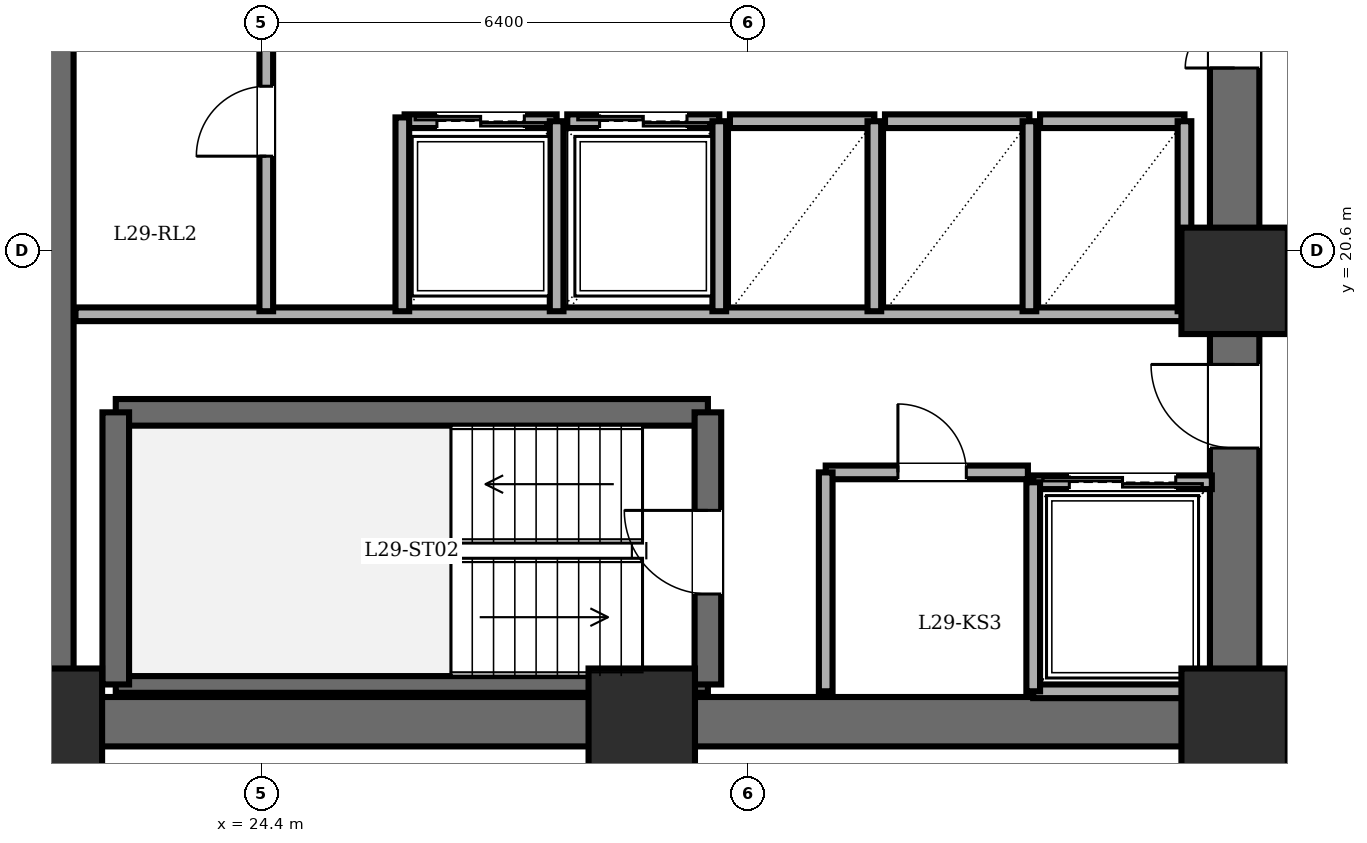
"""IFC4 building model, lengths in metres.
Left out: names, types, materials, properties, quantities, classifications, styles, units other than length and angle.
Written with IfcOpenShell. Run it as: python <this file> out.ifc"""

import sys

from ifc_helpers import new_model, si_unit, direction, frame, frame_2d, origin, origin_2d, place, context, subcontext, project, spatial, rectangle, extrude, element, fill, save


model = new_model("IFC4")
c1 = context("Model", 3, precision=1e-05, world=origin(), true_north=direction((0.0, 1.0)))
c2 = subcontext(c1, "Body", "Model", "MODEL_VIEW")
j1 = project(units=[si_unit("LENGTHUNIT", "METRE"), si_unit("PLANEANGLEUNIT", "RADIAN")], contexts=[c1])
p1 = place(None, origin())
s1 = spatial("IfcSite", under=j1, at=p1, CompositionType="ELEMENT")
p2 = place(p1, origin())
s2 = spatial("IfcBuilding", under=s1, at=p2, CompositionType="ELEMENT")
p3 = place(p2, frame((0.0, 0.0, 111.5)))
s3 = spatial("IfcBuildingStorey", under=s2, at=p3, CompositionType="ELEMENT", Elevation=111.5)
for number, where, z_axis, x_axis in (
    (1, (21.6, 14.4, 0.0), (0.0, 0.0, 1.0), (1.0, 0.0, 0.0)),
    (2, (29.4, 14.4, 0.0), (0.0, 0.0, 1.0), (1.0, 0.0, 0.0)),
    (3, (37.2, 14.4, 0.0), (0.0, 0.0, 1.0), (1.0, 0.0, 0.0)),
    (4, (37.2, 20.2, 0.0), (0.0, 0.0, 1.0), (1.0, 0.0, 0.0)),
):
    element("IfcColumn", number, at=place(p3, frame(where, z_axis=z_axis, x_axis=x_axis)), inside=s3, PredefinedType="COLUMN", context=c2, shape_type="SweptSolid", body=[
        extrude(rectangle(XDim=1.4, YDim=1.4, at=origin_2d()), origin(), (0.0, 0.0, 1.0), 3.6),
    ])
p4 = place(p3, frame((21.6, 14.4, 0.0), z_axis=(0.0, 0.0, 1.0), x_axis=(0.0, 1.0, 0.0)))
e5 = element("IfcWall", 5, at=p4, inside=s3, PredefinedType="SHEAR", context=c2, shape_type="SweptSolid", body=[
    extrude(rectangle(XDim=19.2, YDim=0.65, at=frame_2d((9.6, 0.0))), origin(), (0.0, 0.0, 1.0), 3.4),
])
p5 = place(p3, frame((37.2, 14.4, 0.0), z_axis=(0.0, 0.0, 1.0), x_axis=(-1.0, 0.0, 0.0)))
e6 = element("IfcWall", 6, at=p5, inside=s3, PredefinedType="SHEAR", context=c2, shape_type="SweptSolid", body=[
    extrude(rectangle(XDim=15.6, YDim=0.65, at=frame_2d((7.8, 0.0))), origin(), (0.0, 0.0, 1.0), 3.4),
])
p6 = place(p3, frame((37.2, 14.4, 0.0), z_axis=(0.0, 0.0, 1.0), x_axis=(0.0, 1.0, 0.0)))
e7 = element("IfcWall", 7, at=p6, inside=s3, PredefinedType="SHEAR", context=c2, shape_type="SweptSolid", body=[
    extrude(rectangle(XDim=19.2, YDim=0.65, at=frame_2d((9.6, 0.0))), origin(), (0.0, 0.0, 1.0), 3.4),
])
p7 = place(p6, frame((15.8, 0.0, 0.0)))
e8 = element("IfcOpeningElement", 8, at=p7, cuts=e7, PredefinedType="OPENING", context=c2, shape_type="SweptSolid", body=[
    extrude(rectangle(XDim=1.15, YDim=2.15, at=frame_2d((0.575, 1.075))), frame((0.0, 0.335, 0.0), z_axis=(0.0, -1.0, 0.0), x_axis=(1.0, 0.0, 0.0)), (0.0, 0.0, 1.0), 0.67),
])
p8 = place(p6, frame((3.6, 0.0, 0.0)))
e9 = element("IfcOpeningElement", 9, at=p8, cuts=e7, PredefinedType="OPENING", context=c2, shape_type="SweptSolid", body=[
    extrude(rectangle(XDim=1.1, YDim=2.15, at=frame_2d((0.55, 1.075))), frame((0.0, 0.335, 0.0), z_axis=(0.0, -1.0, 0.0), x_axis=(1.0, 0.0, 0.0)), (0.0, 0.0, 1.0), 0.67),
])
p9 = place(p6, frame((8.6, 0.0, 0.0)))
e10 = element("IfcOpeningElement", 10, at=p9, cuts=e7, PredefinedType="OPENING", context=c2, shape_type="SweptSolid", body=[
    extrude(rectangle(XDim=1.3, YDim=2.2, at=frame_2d((0.65, 1.1))), frame((0.0, 0.335, 0.0), z_axis=(0.0, -1.0, 0.0), x_axis=(1.0, 0.0, 0.0)), (0.0, 0.0, 1.0), 0.67),
])
p10 = place(p3, frame((22.48, 18.47, 0.0), z_axis=(0.0, 0.0, 1.0), x_axis=(1.0, 0.0, 0.0)))
e11 = element("IfcWall", 11, at=p10, inside=s3, PredefinedType="SOLIDWALL", context=c2, shape_type="SweptSolid", body=[
    extrude(rectangle(XDim=7.79, YDim=0.35, at=frame_2d((3.895, 0.0))), origin(), (0.0, 0.0, 1.0), 3.4),
])
p11 = place(p3, frame((22.48, 14.89, 0.0), z_axis=(0.0, 0.0, 1.0), x_axis=(1.0, 0.0, 0.0)))
e12 = element("IfcWall", 12, at=p11, inside=s3, PredefinedType="PARTITIONING", context=c2, shape_type="SweptSolid", body=[
    extrude(rectangle(XDim=7.79, YDim=0.22, at=frame_2d((3.895, 0.0))), origin(), (0.0, 0.0, 1.0), 3.4),
])
p12 = place(p3, frame((22.48, 14.89, 0.0), z_axis=(0.0, 0.0, 1.0), x_axis=(0.0, 1.0, 0.0)))
e13 = element("IfcWall", 13, at=p12, inside=s3, PredefinedType="SOLIDWALL", context=c2, shape_type="SweptSolid", body=[
    extrude(rectangle(XDim=3.58, YDim=0.35, at=frame_2d((1.79, 0.0))), origin(), (0.0, 0.0, 1.0), 3.4),
])
p13 = place(p3, frame((30.27, 14.89, 0.0), z_axis=(0.0, 0.0, 1.0), x_axis=(0.0, 1.0, 0.0)))
e14 = element("IfcWall", 14, at=p13, inside=s3, PredefinedType="SOLIDWALL", context=c2, shape_type="SweptSolid", body=[
    extrude(rectangle(XDim=3.58, YDim=0.35, at=frame_2d((1.79, 0.0))), origin(), (0.0, 0.0, 1.0), 3.4),
])
p14 = place(p13, frame((1.19, 0.0, 0.0)))
e15 = element("IfcOpeningElement", 15, at=p14, cuts=e14, PredefinedType="OPENING", context=c2, shape_type="SweptSolid", body=[
    extrude(rectangle(XDim=1.1, YDim=2.15, at=frame_2d((0.55, 1.075))), frame((0.0, 0.185, 0.0), z_axis=(0.0, -1.0, 0.0), x_axis=(1.0, 0.0, 0.0)), (0.0, 0.0, 1.0), 0.37),
])
p15 = place(p3, frame((21.95, 19.76, 0.0), z_axis=(0.0, 0.0, 1.0), x_axis=(1.0, 0.0, 0.0)))
e16 = element("IfcWall", 16, at=p15, inside=s3, PredefinedType="PARTITIONING", context=c2, shape_type="SweptSolid", body=[
    extrude(rectangle(XDim=14.87, YDim=0.18, at=frame_2d((7.435, 0.0))), origin(), (0.0, 0.0, 1.0), 3.4),
])
p16 = place(p3, frame((31.82, 17.68, 0.0), z_axis=(0.0, 0.0, 1.0), x_axis=(1.0, 0.0, 0.0)))
e17 = element("IfcWall", 17, at=p16, inside=s3, PredefinedType="PARTITIONING", context=c2, shape_type="SweptSolid", body=[
    extrude(rectangle(XDim=2.66, YDim=0.18, at=frame_2d((1.33, 0.0))), origin(), (0.0, 0.0, 1.0), 3.4),
])
p17 = place(p16, frame((0.95, 0.0, 0.0)))
e18 = element("IfcOpeningElement", 18, at=p17, cuts=e17, PredefinedType="OPENING", context=c2, shape_type="SweptSolid", body=[
    extrude(rectangle(XDim=0.9, YDim=2.05, at=frame_2d((0.45, 1.025))), frame((0.0, 0.1, 0.0), z_axis=(0.0, -1.0, 0.0), x_axis=(1.0, 0.0, 0.0)), (0.0, 0.0, 1.0), 0.2),
])
p18 = place(p3, frame((31.82, 14.8, 0.0), z_axis=(0.0, 0.0, 1.0), x_axis=(0.0, 1.0, 0.0)))
e19 = element("IfcWall", 19, at=p18, inside=s3, PredefinedType="PARTITIONING", context=c2, shape_type="SweptSolid", body=[
    extrude(rectangle(XDim=2.88, YDim=0.18, at=frame_2d((1.44, 0.0))), origin(), (0.0, 0.0, 1.0), 3.4),
])
p19 = place(p3, frame((34.55, 17.55, 0.0), z_axis=(0.0, 0.0, 1.0), x_axis=(1.0, 0.0, 0.0)))
e20 = element("IfcWall", 20, at=p19, inside=s3, PredefinedType="PARTITIONING", context=c2, shape_type="SweptSolid", body=[
    extrude(rectangle(XDim=2.35, YDim=0.18, at=frame_2d((1.175, 0.0))), origin(), (0.0, 0.0, 1.0), 3.4),
])
p20 = place(p19, frame((0.475, 0.0, 0.0)))
e21 = element("IfcOpeningElement", 21, at=p20, cuts=e20, PredefinedType="OPENING", context=c2, shape_type="SweptSolid", body=[
    extrude(rectangle(XDim=1.4, YDim=2.3, at=frame_2d((0.7, 1.15))), frame((0.0, 0.1, 0.0), z_axis=(0.0, -1.0, 0.0), x_axis=(1.0, 0.0, 0.0)), (0.0, 0.0, 1.0), 0.2),
])
p21 = place(p3, frame((36.9, 14.8, 0.0), z_axis=(0.0, 0.0, 1.0), x_axis=(-1.0, 0.0, 0.0)))
e22 = element("IfcWall", 22, at=p21, inside=s3, PredefinedType="PARTITIONING", context=c2, shape_type="SweptSolid", body=[
    extrude(rectangle(XDim=2.35, YDim=0.18, at=frame_2d((1.175, 0.0))), origin(), (0.0, 0.0, 1.0), 3.4),
])
p22 = place(p3, frame((34.55, 17.55, 0.0), z_axis=(0.0, 0.0, 1.0), x_axis=(0.0, -1.0, 0.0)))
e23 = element("IfcWall", 23, at=p22, inside=s3, PredefinedType="PARTITIONING", context=c2, shape_type="SweptSolid", body=[
    extrude(rectangle(XDim=2.75, YDim=0.18, at=frame_2d((1.375, 0.0))), origin(), (0.0, 0.0, 1.0), 3.4),
])
p23 = place(p3, frame((26.28, 22.3, 0.0), z_axis=(0.0, 0.0, 1.0), x_axis=(1.0, 0.0, 0.0)))
e24 = element("IfcWall", 24, at=p23, inside=s3, PredefinedType="PARTITIONING", context=c2, shape_type="SweptSolid", body=[
    extrude(rectangle(XDim=2.0, YDim=0.18, at=frame_2d((1.0, 0.0))), origin(), (0.0, 0.0, 1.0), 3.4),
])
p24 = place(p23, frame((0.425, 0.0, 0.0)))
e25 = element("IfcOpeningElement", 25, at=p24, cuts=e24, PredefinedType="OPENING", context=c2, shape_type="SweptSolid", body=[
    extrude(rectangle(XDim=1.15, YDim=2.2, at=frame_2d((0.575, 1.1))), frame((0.0, 0.1, 0.0), z_axis=(0.0, -1.0, 0.0), x_axis=(1.0, 0.0, 0.0)), (0.0, 0.0, 1.0), 0.2),
])
p25 = place(p3, frame((28.28, 19.8, 0.0), z_axis=(0.0, 0.0, 1.0), x_axis=(0.0, 1.0, 0.0)))
e26 = element("IfcWall", 26, at=p25, inside=s3, PredefinedType="PARTITIONING", context=c2, shape_type="SweptSolid", body=[
    extrude(rectangle(XDim=2.5, YDim=0.18, at=frame_2d((1.25, 0.0))), origin(), (0.0, 0.0, 1.0), 3.4),
])
p26 = place(p3, frame((28.42, 22.3, 0.0), z_axis=(0.0, 0.0, 1.0), x_axis=(1.0, 0.0, 0.0)))
e27 = element("IfcWall", 27, at=p26, inside=s3, PredefinedType="PARTITIONING", context=c2, shape_type="SweptSolid", body=[
    extrude(rectangle(XDim=2.0, YDim=0.18, at=frame_2d((1.0, 0.0))), origin(), (0.0, 0.0, 1.0), 3.4),
])
p27 = place(p26, frame((0.425, 0.0, 0.0)))
e28 = element("IfcOpeningElement", 28, at=p27, cuts=e27, PredefinedType="OPENING", context=c2, shape_type="SweptSolid", body=[
    extrude(rectangle(XDim=1.15, YDim=2.2, at=frame_2d((0.575, 1.1))), frame((0.0, 0.1, 0.0), z_axis=(0.0, -1.0, 0.0), x_axis=(1.0, 0.0, 0.0)), (0.0, 0.0, 1.0), 0.2),
])
p28 = place(p3, frame((30.42, 19.8, 0.0), z_axis=(0.0, 0.0, 1.0), x_axis=(0.0, 1.0, 0.0)))
e29 = element("IfcWall", 29, at=p28, inside=s3, PredefinedType="PARTITIONING", context=c2, shape_type="SweptSolid", body=[
    extrude(rectangle(XDim=2.5, YDim=0.18, at=frame_2d((1.25, 0.0))), origin(), (0.0, 0.0, 1.0), 3.4),
])
p29 = place(p3, frame((30.56, 22.3, 0.0), z_axis=(0.0, 0.0, 1.0), x_axis=(1.0, 0.0, 0.0)))
e30 = element("IfcWall", 30, at=p29, inside=s3, PredefinedType="PARTITIONING", context=c2, shape_type="SweptSolid", body=[
    extrude(rectangle(XDim=1.9, YDim=0.18, at=frame_2d((0.95, 0.0))), origin(), (0.0, 0.0, 1.0), 3.4),
])
p30 = place(p3, frame((32.46, 19.8, 0.0), z_axis=(0.0, 0.0, 1.0), x_axis=(0.0, 1.0, 0.0)))
e31 = element("IfcWall", 31, at=p30, inside=s3, PredefinedType="PARTITIONING", context=c2, shape_type="SweptSolid", body=[
    extrude(rectangle(XDim=2.5, YDim=0.18, at=frame_2d((1.25, 0.0))), origin(), (0.0, 0.0, 1.0), 3.4),
])
p31 = place(p3, frame((32.6, 22.3, 0.0), z_axis=(0.0, 0.0, 1.0), x_axis=(1.0, 0.0, 0.0)))
e32 = element("IfcWall", 32, at=p31, inside=s3, PredefinedType="PARTITIONING", context=c2, shape_type="SweptSolid", body=[
    extrude(rectangle(XDim=1.9, YDim=0.18, at=frame_2d((0.95, 0.0))), origin(), (0.0, 0.0, 1.0), 3.4),
])
p32 = place(p3, frame((34.5, 19.8, 0.0), z_axis=(0.0, 0.0, 1.0), x_axis=(0.0, 1.0, 0.0)))
e33 = element("IfcWall", 33, at=p32, inside=s3, PredefinedType="PARTITIONING", context=c2, shape_type="SweptSolid", body=[
    extrude(rectangle(XDim=2.5, YDim=0.18, at=frame_2d((1.25, 0.0))), origin(), (0.0, 0.0, 1.0), 3.4),
])
p33 = place(p3, frame((34.64, 22.3, 0.0), z_axis=(0.0, 0.0, 1.0), x_axis=(1.0, 0.0, 0.0)))
e34 = element("IfcWall", 34, at=p33, inside=s3, PredefinedType="PARTITIONING", context=c2, shape_type="SweptSolid", body=[
    extrude(rectangle(XDim=1.9, YDim=0.18, at=frame_2d((0.95, 0.0))), origin(), (0.0, 0.0, 1.0), 3.4),
])
p34 = place(p3, frame((36.54, 19.8, 0.0), z_axis=(0.0, 0.0, 1.0), x_axis=(0.0, 1.0, 0.0)))
e35 = element("IfcWall", 35, at=p34, inside=s3, PredefinedType="PARTITIONING", context=c2, shape_type="SweptSolid", body=[
    extrude(rectangle(XDim=2.5, YDim=0.18, at=frame_2d((1.25, 0.0))), origin(), (0.0, 0.0, 1.0), 3.4),
])
p35 = place(p3, frame((24.46, 19.8, 0.0), z_axis=(0.0, 0.0, 1.0), x_axis=(0.0, 1.0, 0.0)))
e36 = element("IfcWall", 36, at=p35, inside=s3, PredefinedType="PARTITIONING", context=c2, shape_type="SweptSolid", body=[
    extrude(rectangle(XDim=5.0, YDim=0.18, at=frame_2d((2.5, 0.0))), origin(), (0.0, 0.0, 1.0), 3.4),
])
p36 = place(p35, frame((2.04, 0.0, 0.0)))
e37 = element("IfcOpeningElement", 37, at=p36, cuts=e36, PredefinedType="OPENING", context=c2, shape_type="SweptSolid", body=[
    extrude(rectangle(XDim=0.92, YDim=2.1, at=frame_2d((0.46, 1.05))), frame((0.0, 0.1, 0.0), z_axis=(0.0, -1.0, 0.0), x_axis=(1.0, 0.0, 0.0)), (0.0, 0.0, 1.0), 0.2),
])
p37 = place(p3, frame((26.25, 19.8, 0.0), z_axis=(0.0, 0.0, 1.0), x_axis=(0.0, 1.0, 0.0)))
e38 = element("IfcWall", 38, at=p37, inside=s3, PredefinedType="PARTITIONING", context=c2, shape_type="SweptSolid", body=[
    extrude(rectangle(XDim=2.55, YDim=0.18, at=frame_2d((1.275, 0.0))), origin(), (0.0, 0.0, 1.0), 3.4),
])
p38 = place(p14, origin())
e39 = element("IfcDoor", 39, at=p38, inside=s3, OperationType="SINGLE_SWING_RIGHT", PredefinedType="DOOR", context=c2, shape_type="SweptSolid", body=[
    extrude(rectangle(XDim=1.1, YDim=2.15, at=frame_2d((0.55, 1.075))), frame((0.0, 0.025, 0.0), z_axis=(0.0, -1.0, 0.0), x_axis=(1.0, 0.0, 0.0)), (0.0, 0.0, 1.0), 0.05),
])
fill(e15, e39)
p39 = place(p8, origin())
e40 = element("IfcDoor", 40, at=p39, inside=s3, OperationType="SINGLE_SWING_RIGHT", PredefinedType="DOOR", context=c2, shape_type="SweptSolid", body=[
    extrude(rectangle(XDim=1.1, YDim=2.15, at=frame_2d((0.55, 1.075))), frame((0.0, 0.025, 0.0), z_axis=(0.0, -1.0, 0.0), x_axis=(1.0, 0.0, 0.0)), (0.0, 0.0, 1.0), 0.05),
])
fill(e9, e40)
p40 = place(p17, origin())
e41 = element("IfcDoor", 41, at=p40, inside=s3, OperationType="SINGLE_SWING_LEFT", PredefinedType="DOOR", context=c2, shape_type="SweptSolid", body=[
    extrude(rectangle(XDim=0.9, YDim=2.05, at=frame_2d((0.45, 1.025))), frame((0.0, 0.025, 0.0), z_axis=(0.0, -1.0, 0.0), x_axis=(1.0, 0.0, 0.0)), (0.0, 0.0, 1.0), 0.05),
])
fill(e18, e41)
p41 = place(p20, origin())
e42 = element("IfcDoor", 42, at=p41, inside=s3, OperationType="DOUBLE_DOOR_SLIDING", PredefinedType="DOOR", context=c2, shape_type="SweptSolid", body=[
    extrude(rectangle(XDim=1.4, YDim=2.3, at=frame_2d((0.7, 1.15))), frame((0.0, 0.025, 0.0), z_axis=(0.0, -1.0, 0.0), x_axis=(1.0, 0.0, 0.0)), (0.0, 0.0, 1.0), 0.05),
])
fill(e21, e42)
p42 = place(p24, origin())
e43 = element("IfcDoor", 43, at=p42, inside=s3, OperationType="DOUBLE_DOOR_SLIDING", PredefinedType="DOOR", context=c2, shape_type="SweptSolid", body=[
    extrude(rectangle(XDim=1.15, YDim=2.2, at=frame_2d((0.575, 1.1))), frame((0.0, 0.025, 0.0), z_axis=(0.0, -1.0, 0.0), x_axis=(1.0, 0.0, 0.0)), (0.0, 0.0, 1.0), 0.05),
])
fill(e25, e43)
p43 = place(p27, origin())
e44 = element("IfcDoor", 44, at=p43, inside=s3, OperationType="DOUBLE_DOOR_SLIDING", PredefinedType="DOOR", context=c2, shape_type="SweptSolid", body=[
    extrude(rectangle(XDim=1.15, YDim=2.2, at=frame_2d((0.575, 1.1))), frame((0.0, 0.025, 0.0), z_axis=(0.0, -1.0, 0.0), x_axis=(1.0, 0.0, 0.0)), (0.0, 0.0, 1.0), 0.05),
])
fill(e28, e44)
p44 = place(p36, origin())
e45 = element("IfcDoor", 45, at=p44, inside=s3, OperationType="SINGLE_SWING_LEFT", PredefinedType="DOOR", context=c2, shape_type="SweptSolid", body=[
    extrude(rectangle(XDim=0.92, YDim=2.1, at=frame_2d((0.46, 1.05))), frame((0.0, 0.025, 0.0), z_axis=(0.0, -1.0, 0.0), x_axis=(1.0, 0.0, 0.0)), (0.0, 0.0, 1.0), 0.05),
])
fill(e37, e45)
p45 = place(p9, origin())
e46 = element("IfcDoor", 46, at=p45, inside=s3, OperationType="DOUBLE_DOOR_SINGLE_SWING", PredefinedType="DOOR", context=c2, shape_type="SweptSolid", body=[
    extrude(rectangle(XDim=1.3, YDim=2.2, at=frame_2d((0.65, 1.1))), frame((0.0, 0.025, 0.0), z_axis=(0.0, -1.0, 0.0), x_axis=(1.0, 0.0, 0.0)), (0.0, 0.0, 1.0), 0.05),
])
fill(e10, e46)
save(model, sys.argv[1])
